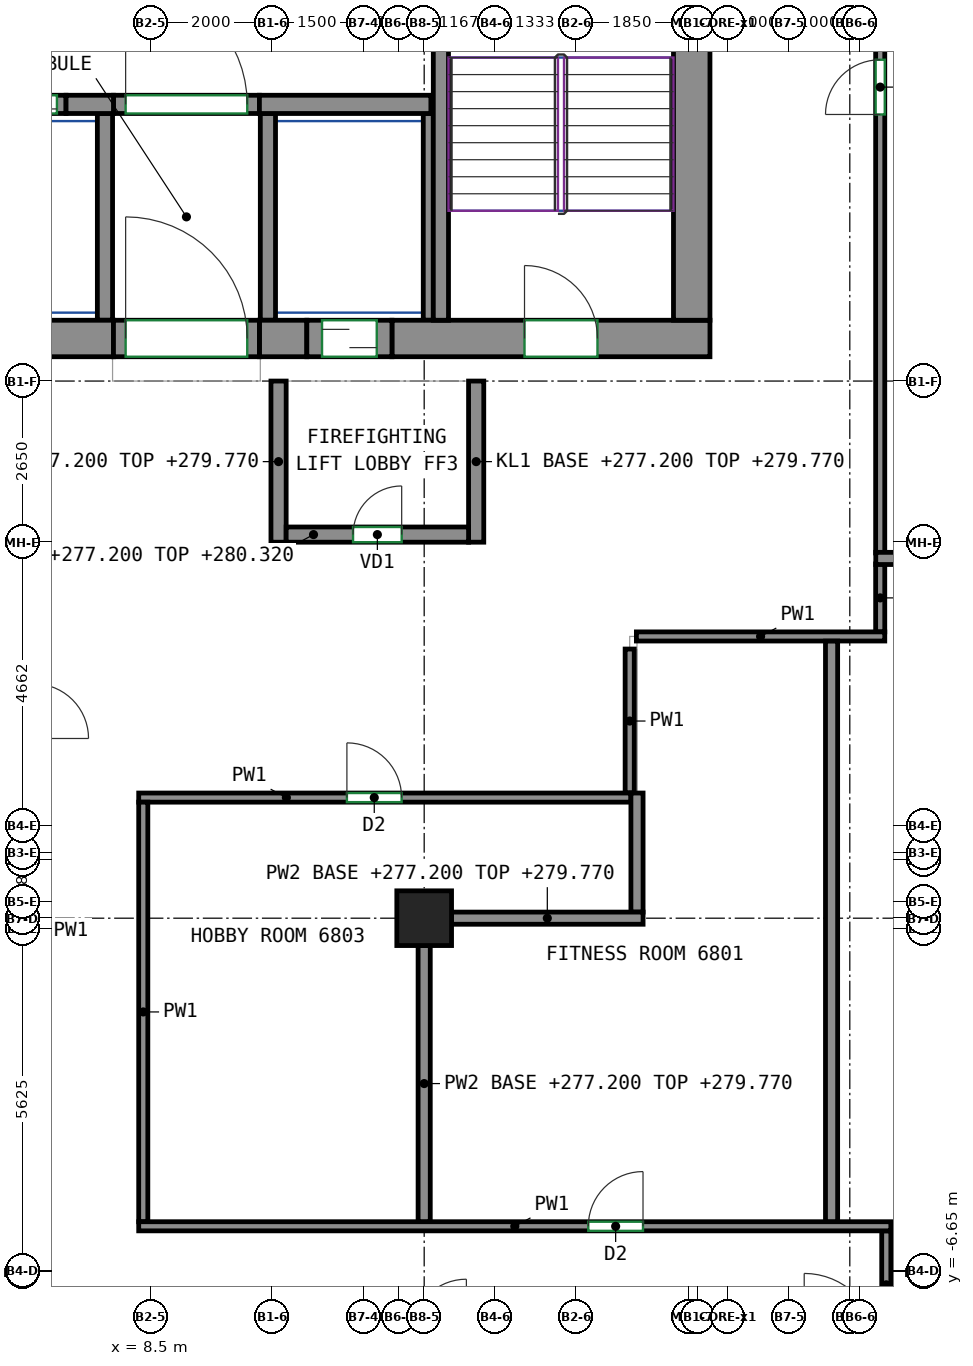
"""IFC4 building model, lengths in metres.
Left out: names, types, materials, properties, quantities, classifications, styles, units other than length and angle.
Written with IfcOpenShell. Run it as: python <this file> out.ifc"""

import sys

from ifc_helpers import new_model, si_unit, direction, frame, frame_2d, origin, origin_2d, place, context, subcontext, project, spatial, rectangle, extrude, source, transform, mapped, element, fill, save


model = new_model("IFC4")
c1 = context("Model", 3, precision=1e-05, world=origin(), true_north=direction((0.0, 1.0)))
c2 = subcontext(c1, "Body", "Model", "MODEL_VIEW")
j1 = project(units=[si_unit("LENGTHUNIT", "METRE"), si_unit("PLANEANGLEUNIT", "RADIAN")], contexts=[c1])
p1 = place(None, origin())
s1 = spatial("IfcSite", under=j1, at=p1, CompositionType="ELEMENT")
p2 = place(p1, origin())
s2 = spatial("IfcBuilding", under=s1, at=p2, CompositionType="ELEMENT")
p3 = place(p2, frame((0.0, 0.0, 277.2)))
s3 = spatial("IfcBuildingStorey", under=s2, at=p3, CompositionType="ELEMENT", Elevation=277.2)
m1 = source(origin(), c2, "Body", "SweptSolid", [
    extrude(rectangle(XDim=0.9, YDim=0.9, at=origin_2d()), origin(), (0.0, 0.0, 1.0), 3.12),
])
p4 = place(p3, frame((13.0, -0.833, 0.0), z_axis=(0.0, 0.0, 1.0), x_axis=(1.0, 0.0, 0.0)))
e1 = element("IfcColumn", 1, at=p4, inside=s3, PredefinedType="COLUMN", context=c2, shape_type="MappedRepresentation", body=[
    mapped(m1, transform((0.0, 0.0, 0.0))),
])
m2 = source(origin(), c2, "Body", "SweptSolid", [
    extrude(rectangle(XDim=14.18, YDim=0.6, at=frame_2d((7.09, 0.0))), origin(), (0.0, 0.0, 1.0), 3.12),
])
p5 = place(p3, frame((-6.29, 8.7, 0.0), z_axis=(0.0, 0.0, 1.0), x_axis=(1.0, 0.0, 0.0)))
e2 = element("IfcWall", 2, at=p5, inside=s3, PredefinedType="SHEAR", context=c2, shape_type="MappedRepresentation", body=[
    mapped(m2, transform((0.0, 0.0, 0.0))),
])
m3 = source(origin(), c2, "Body", "SweptSolid", [
    extrude(rectangle(XDim=0.78, YDim=0.6, at=frame_2d((0.39, 0.0))), origin(), (0.0, 0.0, 1.0), 3.12),
])
p6 = place(p3, frame((10.29, 8.7, 0.0), z_axis=(0.0, 0.0, 1.0), x_axis=(1.0, 0.0, 0.0)))
e3 = element("IfcWall", 3, at=p6, inside=s3, PredefinedType="SHEAR", context=c2, shape_type="MappedRepresentation", body=[
    mapped(m3, transform((0.0, 0.0, 0.0))),
])
m4 = source(origin(), c2, "Body", "SweptSolid", [
    extrude(rectangle(XDim=5.23, YDim=0.6, at=frame_2d((2.615, 0.0))), origin(), (0.0, 0.0, 1.0), 3.12),
])
p7 = place(p3, frame((12.47, 8.7, 0.0), z_axis=(0.0, 0.0, 1.0), x_axis=(1.0, 0.0, 0.0)))
e4 = element("IfcWall", 4, at=p7, inside=s3, PredefinedType="SHEAR", context=c2, shape_type="MappedRepresentation", body=[
    mapped(m4, transform((0.0, 0.0, 0.0))),
])
p8 = place(p7, frame((2.18, 0.0, 0.0)))
e5 = element("IfcOpeningElement", 5, at=p8, cuts=e4, PredefinedType="OPENING", context=c2, shape_type="SweptSolid", body=[
    extrude(rectangle(XDim=1.2, YDim=2.1, at=frame_2d((0.6, 1.05))), frame((0.0, 0.31, 0.0), z_axis=(0.0, -1.0, 0.0), x_axis=(1.0, 0.0, 0.0)), (0.0, 0.0, 1.0), 0.62),
])
m5 = source(origin(), c2, "Body", "SweptSolid", [
    extrude(rectangle(XDim=12.0, YDim=0.6, at=frame_2d((6.0, 0.0))), origin(), (0.0, 0.0, 1.0), 3.12),
])
p9 = place(p3, frame((17.4, 9.0, 0.0), z_axis=(0.0, 0.0, 1.0), x_axis=(0.0, 1.0, 0.0)))
e6 = element("IfcWall", 6, at=p9, inside=s3, PredefinedType="SHEAR", context=c2, shape_type="MappedRepresentation", body=[
    mapped(m5, transform((0.0, 0.0, 0.0))),
])
m6 = source(origin(), c2, "Body", "SweptSolid", [
    extrude(rectangle(XDim=7.75, YDim=0.25, at=frame_2d((3.875, 0.0))), origin(), (0.0, 0.0, 1.0), 3.12),
])
p10 = place(p3, frame((13.275, 9.0, 0.0), z_axis=(0.0, 0.0, 1.0), x_axis=(0.0, 1.0, 0.0)))
e7 = element("IfcWall", 7, at=p10, inside=s3, PredefinedType="SHEAR", context=c2, shape_type="MappedRepresentation", body=[
    mapped(m6, transform((0.0, 0.0, 0.0))),
])
m7 = source(origin(), c2, "Body", "SweptSolid", [
    extrude(rectangle(XDim=0.78, YDim=0.3, at=frame_2d((0.39, 0.0))), origin(), (0.0, 0.0, 1.0), 3.12),
])
p11 = place(p3, frame((7.11, 12.55, 0.0), z_axis=(0.0, 0.0, 1.0), x_axis=(1.0, 0.0, 0.0)))
e8 = element("IfcWall", 8, at=p11, inside=s3, PredefinedType="SHEAR", context=c2, shape_type="MappedRepresentation", body=[
    mapped(m7, transform((0.0, 0.0, 0.0))),
])
m8 = source(origin(), c2, "Body", "SweptSolid", [
    extrude(rectangle(XDim=2.82, YDim=0.3, at=frame_2d((1.41, 0.0))), origin(), (0.0, 0.0, 1.0), 3.12),
])
p12 = place(p3, frame((10.29, 12.55, 0.0), z_axis=(0.0, 0.0, 1.0), x_axis=(1.0, 0.0, 0.0)))
e9 = element("IfcWall", 9, at=p12, inside=s3, PredefinedType="SHEAR", context=c2, shape_type="MappedRepresentation", body=[
    mapped(m8, transform((0.0, 0.0, 0.0))),
])
m9 = source(origin(), c2, "Body", "SweptSolid", [
    extrude(rectangle(XDim=1.4, YDim=0.3, at=frame_2d((0.7, 0.0))), origin(), (0.0, 0.0, 1.0), 3.12),
])
p13 = place(p3, frame((5.71, 12.55, 0.0), z_axis=(0.0, 0.0, 1.0), x_axis=(1.0, 0.0, 0.0)))
e10 = element("IfcWall", 10, at=p13, inside=s3, PredefinedType="PARTITIONING", context=c2, shape_type="MappedRepresentation", body=[
    mapped(m9, transform((0.0, 0.0, 0.0))),
])
p14 = place(p13, frame((0.15, 0.0, 0.0)))
e11 = element("IfcOpeningElement", 11, at=p14, cuts=e10, PredefinedType="OPENING", context=c2, shape_type="SweptSolid", body=[
    extrude(rectangle(XDim=1.1, YDim=2.1, at=frame_2d((0.55, 1.05))), frame((0.0, 0.16, 0.0), z_axis=(0.0, -1.0, 0.0), x_axis=(1.0, 0.0, 0.0)), (0.0, 0.0, 1.0), 0.32),
])
m10 = source(origin(), c2, "Body", "SweptSolid", [
    extrude(rectangle(XDim=2.4, YDim=0.3, at=frame_2d((1.2, 0.0))), origin(), (0.0, 0.0, 1.0), 3.12),
])
p15 = place(p3, frame((7.89, 12.55, 0.0), z_axis=(0.0, 0.0, 1.0), x_axis=(1.0, 0.0, 0.0)))
e12 = element("IfcWall", 12, at=p15, inside=s3, PredefinedType="PARTITIONING", context=c2, shape_type="MappedRepresentation", body=[
    mapped(m10, transform((0.0, 0.0, 0.0))),
])
p16 = place(p15, frame((0.2, 0.0, 0.0)))
e13 = element("IfcOpeningElement", 13, at=p16, cuts=e12, PredefinedType="OPENING", context=c2, shape_type="SweptSolid", body=[
    extrude(rectangle(XDim=2.0, YDim=2.1, at=frame_2d((1.0, 1.05))), frame((0.0, 0.16, 0.0), z_axis=(0.0, -1.0, 0.0), x_axis=(1.0, 0.0, 0.0)), (0.0, 0.0, 1.0), 0.32),
])
m11 = source(origin(), c2, "Body", "SweptSolid", [
    extrude(rectangle(XDim=2.65, YDim=0.25, at=frame_2d((1.325, 0.0))), origin(), (0.0, 0.0, 1.0), 2.57),
])
for number, where, z_axis, x_axis in (
    (14, (10.605, 5.35, 0.0), (0.0, 0.0, 1.0), (0.0, 1.0, 0.0)),
    (15, (13.855, 5.35, 0.0), (0.0, 0.0, 1.0), (0.0, 1.0, 0.0)),
):
    element("IfcWall", number, at=place(p3, frame(where, z_axis=z_axis, x_axis=x_axis)), inside=s3, PredefinedType="PARTITIONING", context=c2, shape_type="MappedRepresentation", body=[
        mapped(m11, transform((0.0, 0.0, 0.0))),
    ])
m12 = source(origin(), c2, "Body", "SweptSolid", [
    extrude(rectangle(XDim=3.0, YDim=0.25, at=frame_2d((1.5, 0.0))), origin(), (0.0, 0.0, 1.0), 3.12),
])
p17 = place(p3, frame((10.73, 5.475, 0.0), z_axis=(0.0, 0.0, 1.0), x_axis=(1.0, 0.0, 0.0)))
e16 = element("IfcWall", 16, at=p17, inside=s3, PredefinedType="PARTITIONING", context=c2, shape_type="MappedRepresentation", body=[
    mapped(m12, transform((0.0, 0.0, 0.0))),
])
p18 = place(p17, frame((1.1, 0.0, 0.0)))
e17 = element("IfcOpeningElement", 17, at=p18, cuts=e16, PredefinedType="OPENING", context=c2, shape_type="SweptSolid", body=[
    extrude(rectangle(XDim=0.8, YDim=2.0, at=frame_2d((0.4, 1.0))), frame((0.0, 0.135, 0.0), z_axis=(0.0, -1.0, 0.0), x_axis=(1.0, 0.0, 0.0)), (0.0, 0.0, 1.0), 0.27),
])
m13 = source(origin(), c2, "Body", "SweptSolid", [
    extrude(rectangle(XDim=3.4, YDim=0.25, at=frame_2d((1.7, 0.0))), origin(), (0.0, 0.0, 1.0), 3.12),
])
p19 = place(p3, frame((10.43, 9.0, 0.0), z_axis=(0.0, 0.0, 1.0), x_axis=(0.0, 1.0, 0.0)))
e18 = element("IfcWall", 18, at=p19, inside=s3, PredefinedType="PARTITIONING", context=c2, shape_type="MappedRepresentation", body=[
    mapped(m13, transform((0.0, 0.0, 0.0))),
])
m14 = source(origin(), c2, "Body", "SweptSolid", [
    extrude(rectangle(XDim=3.4, YDim=0.165, at=frame_2d((1.7, 0.0))), origin(), (0.0, 0.0, 1.0), 3.12),
])
p20 = place(p3, frame((13.067, 9.0, 0.0), z_axis=(0.0, 0.0, 1.0), x_axis=(0.0, 1.0, 0.0)))
e19 = element("IfcWall", 19, at=p20, inside=s3, PredefinedType="PARTITIONING", context=c2, shape_type="MappedRepresentation", body=[
    mapped(m14, transform((0.0, 0.0, 0.0))),
])
p21 = place(p3, frame((7.75, 9.0, 0.0), z_axis=(0.0, 0.0, 1.0), x_axis=(0.0, 1.0, 0.0)))
e20 = element("IfcWall", 20, at=p21, inside=s3, PredefinedType="PARTITIONING", context=c2, shape_type="MappedRepresentation", body=[
    mapped(m13, transform((0.0, 0.0, 0.0))),
])
m15 = source(origin(), c2, "Body", "SweptSolid", [
    extrude(rectangle(XDim=2.4, YDim=0.6, at=frame_2d((1.2, 0.0))), origin(), (0.0, 0.0, 1.0), 2.7),
])
p22 = place(p3, frame((7.89, 8.7, 0.0), z_axis=(0.0, 0.0, 1.0), x_axis=(1.0, 0.0, 0.0)))
e21 = element("IfcWall", 21, at=p22, inside=s3, PredefinedType="PARTITIONING", context=c2, shape_type="MappedRepresentation", body=[
    mapped(m15, transform((0.0, 0.0, 0.0))),
])
p23 = place(p22, frame((0.2, 0.0, 0.0)))
e22 = element("IfcOpeningElement", 22, at=p23, cuts=e21, PredefinedType="OPENING", context=c2, shape_type="SweptSolid", body=[
    extrude(rectangle(XDim=2.0, YDim=2.1, at=frame_2d((1.0, 1.05))), frame((0.0, 0.31, 0.0), z_axis=(0.0, -1.0, 0.0), x_axis=(1.0, 0.0, 0.0)), (0.0, 0.0, 1.0), 0.62),
])
m16 = source(origin(), c2, "Body", "SweptSolid", [
    extrude(rectangle(XDim=1.4, YDim=0.6, at=frame_2d((0.7, 0.0))), origin(), (0.0, 0.0, 1.0), 2.7),
])
p24 = place(p3, frame((11.07, 8.7, 0.0), z_axis=(0.0, 0.0, 1.0), x_axis=(1.0, 0.0, 0.0)))
e23 = element("IfcWall", 23, at=p24, inside=s3, PredefinedType="PARTITIONING", context=c2, shape_type="MappedRepresentation", body=[
    mapped(m16, transform((0.0, 0.0, 0.0))),
])
p25 = place(p24, frame((0.25, 0.0, 0.0)))
e24 = element("IfcOpeningElement", 24, at=p25, cuts=e23, PredefinedType="OPENING", context=c2, shape_type="SweptSolid", body=[
    extrude(rectangle(XDim=0.9, YDim=2.1, at=frame_2d((0.45, 1.05))), frame((0.0, 0.31, 0.0), z_axis=(0.0, -1.0, 0.0), x_axis=(1.0, 0.0, 0.0)), (0.0, 0.0, 1.0), 0.62),
])
p26 = place(p3, frame((20.5, 3.875, 0.0), z_axis=(0.0, 0.0, 1.0), x_axis=(0.0, 1.0, 0.0)))
e25 = element("IfcWall", 25, at=p26, inside=s3, PredefinedType="PARTITIONING", context=c2, shape_type="SweptSolid", body=[
    extrude(rectangle(XDim=1.118, YDim=0.15, at=frame_2d((0.559, 0.0))), origin(), (0.0, 0.0, 1.0), 3.12),
])
p27 = place(p3, frame((20.6, -7.75, 0.0), z_axis=(0.0, 0.0, 1.0), x_axis=(0.0, 1.0, 0.0)))
e26 = element("IfcWall", 26, at=p27, inside=s3, PredefinedType="PARTITIONING", context=c2, shape_type="SweptSolid", body=[
    extrude(rectangle(XDim=1.775, YDim=0.15, at=frame_2d((0.887, 0.0))), origin(), (0.0, 0.0, 1.0), 3.12),
])
p28 = place(p3, frame((20.5, 5.173, 0.0), z_axis=(0.0, 0.0, 1.0), x_axis=(0.0, 1.0, 0.0)))
e27 = element("IfcWall", 27, at=p28, inside=s3, PredefinedType="PARTITIONING", context=c2, shape_type="SweptSolid", body=[
    extrude(rectangle(XDim=17.927, YDim=0.15, at=frame_2d((8.963, 0.0))), origin(), (0.0, 0.0, 1.0), 3.12),
])
p29 = place(p28, frame((7.211, 0.0, 0.0)))
e28 = element("IfcOpeningElement", 28, at=p29, cuts=e27, PredefinedType="OPENING", context=c2, shape_type="SweptSolid", body=[
    extrude(rectangle(XDim=0.9, YDim=2.1, at=frame_2d((0.45, 1.05))), frame((0.0, 0.085, 0.0), z_axis=(0.0, -1.0, 0.0), x_axis=(1.0, 0.0, 0.0)), (0.0, 0.0, 1.0), 0.17),
])
p30 = place(p3, frame((16.38, 1.225, 0.0), z_axis=(0.0, 0.0, 1.0), x_axis=(0.0, 1.0, 0.0)))
e29 = element("IfcWall", 29, at=p30, inside=s3, PredefinedType="PARTITIONING", context=c2, shape_type="SweptSolid", body=[
    extrude(rectangle(XDim=2.368, YDim=0.15, at=frame_2d((1.184, 0.0))), origin(), (0.0, 0.0, 1.0), 3.12),
])
p31 = place(p3, frame((8.305, 1.15, 0.0), z_axis=(0.0, 0.0, 1.0), x_axis=(1.0, 0.0, 0.0)))
e30 = element("IfcWall", 30, at=p31, inside=s3, PredefinedType="PARTITIONING", context=c2, shape_type="SweptSolid", body=[
    extrude(rectangle(XDim=8.095, YDim=0.15, at=frame_2d((4.047, 0.0))), origin(), (0.0, 0.0, 1.0), 3.12),
])
p32 = place(p31, frame((3.424, 0.0, 0.0)))
e31 = element("IfcOpeningElement", 31, at=p32, cuts=e30, PredefinedType="OPENING", context=c2, shape_type="SweptSolid", body=[
    extrude(rectangle(XDim=0.9, YDim=2.1, at=frame_2d((0.45, 1.05))), frame((0.0, 0.085, 0.0), z_axis=(0.0, -1.0, 0.0), x_axis=(1.0, 0.0, 0.0)), (0.0, 0.0, 1.0), 0.17),
])
p33 = place(p3, frame((8.38, -5.825, 0.0), z_axis=(0.0, 0.0, 1.0), x_axis=(0.0, 1.0, 0.0)))
e32 = element("IfcWall", 32, at=p33, inside=s3, PredefinedType="PARTITIONING", context=c2, shape_type="SweptSolid", body=[
    extrude(rectangle(XDim=6.9, YDim=0.15, at=frame_2d((3.45, 0.0))), origin(), (0.0, 0.0, 1.0), 3.12),
])
p34 = place(p3, frame((8.305, -5.9, 0.0), z_axis=(0.0, 0.0, 1.0), x_axis=(1.0, 0.0, 0.0)))
e33 = element("IfcWall", 33, at=p34, inside=s3, PredefinedType="PARTITIONING", context=c2, shape_type="SweptSolid", body=[
    extrude(rectangle(XDim=12.37, YDim=0.15, at=frame_2d((6.185, 0.0))), origin(), (0.0, 0.0, 1.0), 3.12),
])
p35 = place(p34, frame((7.394, 0.0, 0.0)))
e34 = element("IfcOpeningElement", 34, at=p35, cuts=e33, PredefinedType="OPENING", context=c2, shape_type="SweptSolid", body=[
    extrude(rectangle(XDim=0.9, YDim=2.1, at=frame_2d((0.45, 1.05))), frame((0.0, 0.085, 0.0), z_axis=(0.0, -1.0, 0.0), x_axis=(1.0, 0.0, 0.0)), (0.0, 0.0, 1.0), 0.17),
])
p36 = place(p3, frame((16.49, 3.8, 0.0), z_axis=(0.0, 0.0, 1.0), x_axis=(1.0, 0.0, 0.0)))
e35 = element("IfcWall", 35, at=p36, inside=s3, PredefinedType="PARTITIONING", context=c2, shape_type="SweptSolid", body=[
    extrude(rectangle(XDim=4.085, YDim=0.15, at=frame_2d((2.042, 0.0))), origin(), (0.0, 0.0, 1.0), 3.12),
])
p37 = place(p3, frame((23.25, 5.083, 0.0), z_axis=(0.0, 0.0, 1.0), x_axis=(-1.0, 0.0, 0.0)))
e36 = element("IfcWall", 36, at=p37, inside=s3, PredefinedType="PARTITIONING", context=c2, shape_type="SweptSolid", body=[
    extrude(rectangle(XDim=2.823, YDim=0.2, at=frame_2d((1.412, 0.0))), origin(), (0.0, 0.0, 1.0), 3.12),
])
p38 = place(p3, frame((19.7, 3.723, 0.0), z_axis=(0.0, 0.0, 1.0), x_axis=(0.0, -1.0, 0.0)))
e37 = element("IfcWall", 37, at=p38, inside=s3, PredefinedType="PARTITIONING", context=c2, shape_type="SweptSolid", body=[
    extrude(rectangle(XDim=9.546, YDim=0.2, at=frame_2d((4.773, 0.0))), origin(), (0.0, 0.0, 1.0), 3.12),
])
p39 = place(p3, frame((16.5, -0.733, 0.0), z_axis=(0.0, 0.0, 1.0), x_axis=(0.0, 1.0, 0.0)))
e38 = element("IfcWall", 38, at=p39, inside=s3, PredefinedType="PARTITIONING", context=c2, shape_type="SweptSolid", body=[
    extrude(rectangle(XDim=1.958, YDim=0.2, at=frame_2d((0.979, 0.0))), origin(), (0.0, 0.0, 1.0), 3.12),
])
p40 = place(p3, frame((13.45, -0.833, 0.0), z_axis=(0.0, 0.0, 1.0), x_axis=(1.0, 0.0, 0.0)))
e39 = element("IfcWall", 39, at=p40, inside=s3, PredefinedType="PARTITIONING", context=c2, shape_type="SweptSolid", body=[
    extrude(rectangle(XDim=3.15, YDim=0.2, at=frame_2d((1.575, 0.0))), origin(), (0.0, 0.0, 1.0), 2.57),
])
p41 = place(p3, frame((13.0, -5.823, 0.0), z_axis=(0.0, 0.0, 1.0), x_axis=(0.0, 1.0, 0.0)))
e40 = element("IfcWall", 40, at=p41, inside=s3, PredefinedType="PARTITIONING", context=c2, shape_type="SweptSolid", body=[
    extrude(rectangle(XDim=4.54, YDim=0.2, at=frame_2d((2.27, 0.0))), origin(), (0.0, 0.0, 1.0), 2.57),
])
p42 = place(p16, origin())
e41 = element("IfcDoor", 41, at=p42, inside=s3, OperationType="DOUBLE_DOOR_SINGLE_SWING", PredefinedType="DOOR", context=c2, shape_type="SweptSolid", body=[
    extrude(rectangle(XDim=2.0, YDim=2.1, at=frame_2d((1.0, 1.05))), frame((0.0, 0.025, 0.0), z_axis=(0.0, -1.0, 0.0), x_axis=(1.0, 0.0, 0.0)), (0.0, 0.0, 1.0), 0.05),
])
fill(e13, e41)
p43 = place(p23, origin())
e42 = element("IfcDoor", 42, at=p43, inside=s3, OperationType="DOUBLE_DOOR_SINGLE_SWING", PredefinedType="DOOR", context=c2, shape_type="SweptSolid", body=[
    extrude(rectangle(XDim=2.0, YDim=2.1, at=frame_2d((1.0, 1.05))), frame((0.0, 0.205, 0.0), z_axis=(0.0, -1.0, 0.0), x_axis=(1.0, 0.0, 0.0)), (0.0, 0.0, 1.0), 0.05),
])
fill(e22, e42)
p44 = place(p18, origin())
e43 = element("IfcDoor", 43, at=p44, inside=s3, OperationType="SINGLE_SWING_RIGHT", PredefinedType="DOOR", context=c2, shape_type="SweptSolid", body=[
    extrude(rectangle(XDim=0.8, YDim=2.0, at=frame_2d((0.4, 1.0))), frame((0.0, 0.025, 0.0), z_axis=(0.0, -1.0, 0.0), x_axis=(1.0, 0.0, 0.0)), (0.0, 0.0, 1.0), 0.05),
])
fill(e17, e43)
p45 = place(p25, origin())
e44 = element("IfcDoor", 44, at=p45, inside=s3, OperationType="SLIDING_TO_LEFT", PredefinedType="DOOR", context=c2, shape_type="SweptSolid", body=[
    extrude(rectangle(XDim=0.9, YDim=2.1, at=frame_2d((0.45, 1.05))), frame((0.0, 0.205, 0.0), z_axis=(0.0, -1.0, 0.0), x_axis=(1.0, 0.0, 0.0)), (0.0, 0.0, 1.0), 0.05),
])
fill(e24, e44)
p46 = place(p14, origin())
e45 = element("IfcDoor", 45, at=p46, inside=s3, OperationType="DOUBLE_DOOR_SLIDING", PredefinedType="DOOR", context=c2, shape_type="SweptSolid", body=[
    extrude(rectangle(XDim=1.1, YDim=2.1, at=frame_2d((0.55, 1.05))), frame((0.0, 0.025, 0.0), z_axis=(0.0, -1.0, 0.0), x_axis=(1.0, 0.0, 0.0)), (0.0, 0.0, 1.0), 0.05),
])
fill(e11, e45)
p47 = place(p8, origin())
e46 = element("IfcDoor", 46, at=p47, inside=s3, OperationType="DOUBLE_DOOR_SINGLE_SWING", PredefinedType="DOOR", context=c2, shape_type="SweptSolid", body=[
    extrude(rectangle(XDim=1.2, YDim=2.1, at=frame_2d((0.6, 1.05))), frame((0.0, 0.205, 0.0), z_axis=(0.0, -1.0, 0.0), x_axis=(1.0, 0.0, 0.0)), (0.0, 0.0, 1.0), 0.05),
])
fill(e5, e46)
p48 = place(p35, origin())
e47 = element("IfcDoor", 47, at=p48, inside=s3, OperationType="SINGLE_SWING_RIGHT", PredefinedType="DOOR", context=c2, shape_type="SweptSolid", body=[
    extrude(rectangle(XDim=0.9, YDim=2.1, at=frame_2d((0.45, 1.05))), frame((0.0, 0.025, 0.0), z_axis=(0.0, -1.0, 0.0), x_axis=(1.0, 0.0, 0.0)), (0.0, 0.0, 1.0), 0.05),
])
fill(e34, e47)
p49 = place(p32, origin())
e48 = element("IfcDoor", 48, at=p49, inside=s3, OperationType="SINGLE_SWING_LEFT", PredefinedType="DOOR", context=c2, shape_type="SweptSolid", body=[
    extrude(rectangle(XDim=0.9, YDim=2.1, at=frame_2d((0.45, 1.05))), frame((0.0, 0.025, 0.0), z_axis=(0.0, -1.0, 0.0), x_axis=(1.0, 0.0, 0.0)), (0.0, 0.0, 1.0), 0.05),
])
fill(e31, e48)
p50 = place(p29, origin())
e49 = element("IfcDoor", 49, at=p50, inside=s3, OperationType="SINGLE_SWING_LEFT", PredefinedType="DOOR", context=c2, shape_type="SweptSolid", body=[
    extrude(rectangle(XDim=0.9, YDim=2.1, at=frame_2d((0.45, 1.05))), frame((0.0, 0.025, 0.0), z_axis=(0.0, -1.0, 0.0), x_axis=(1.0, 0.0, 0.0)), (0.0, 0.0, 1.0), 0.05),
])
fill(e28, e49)
save(model, sys.argv[1])
